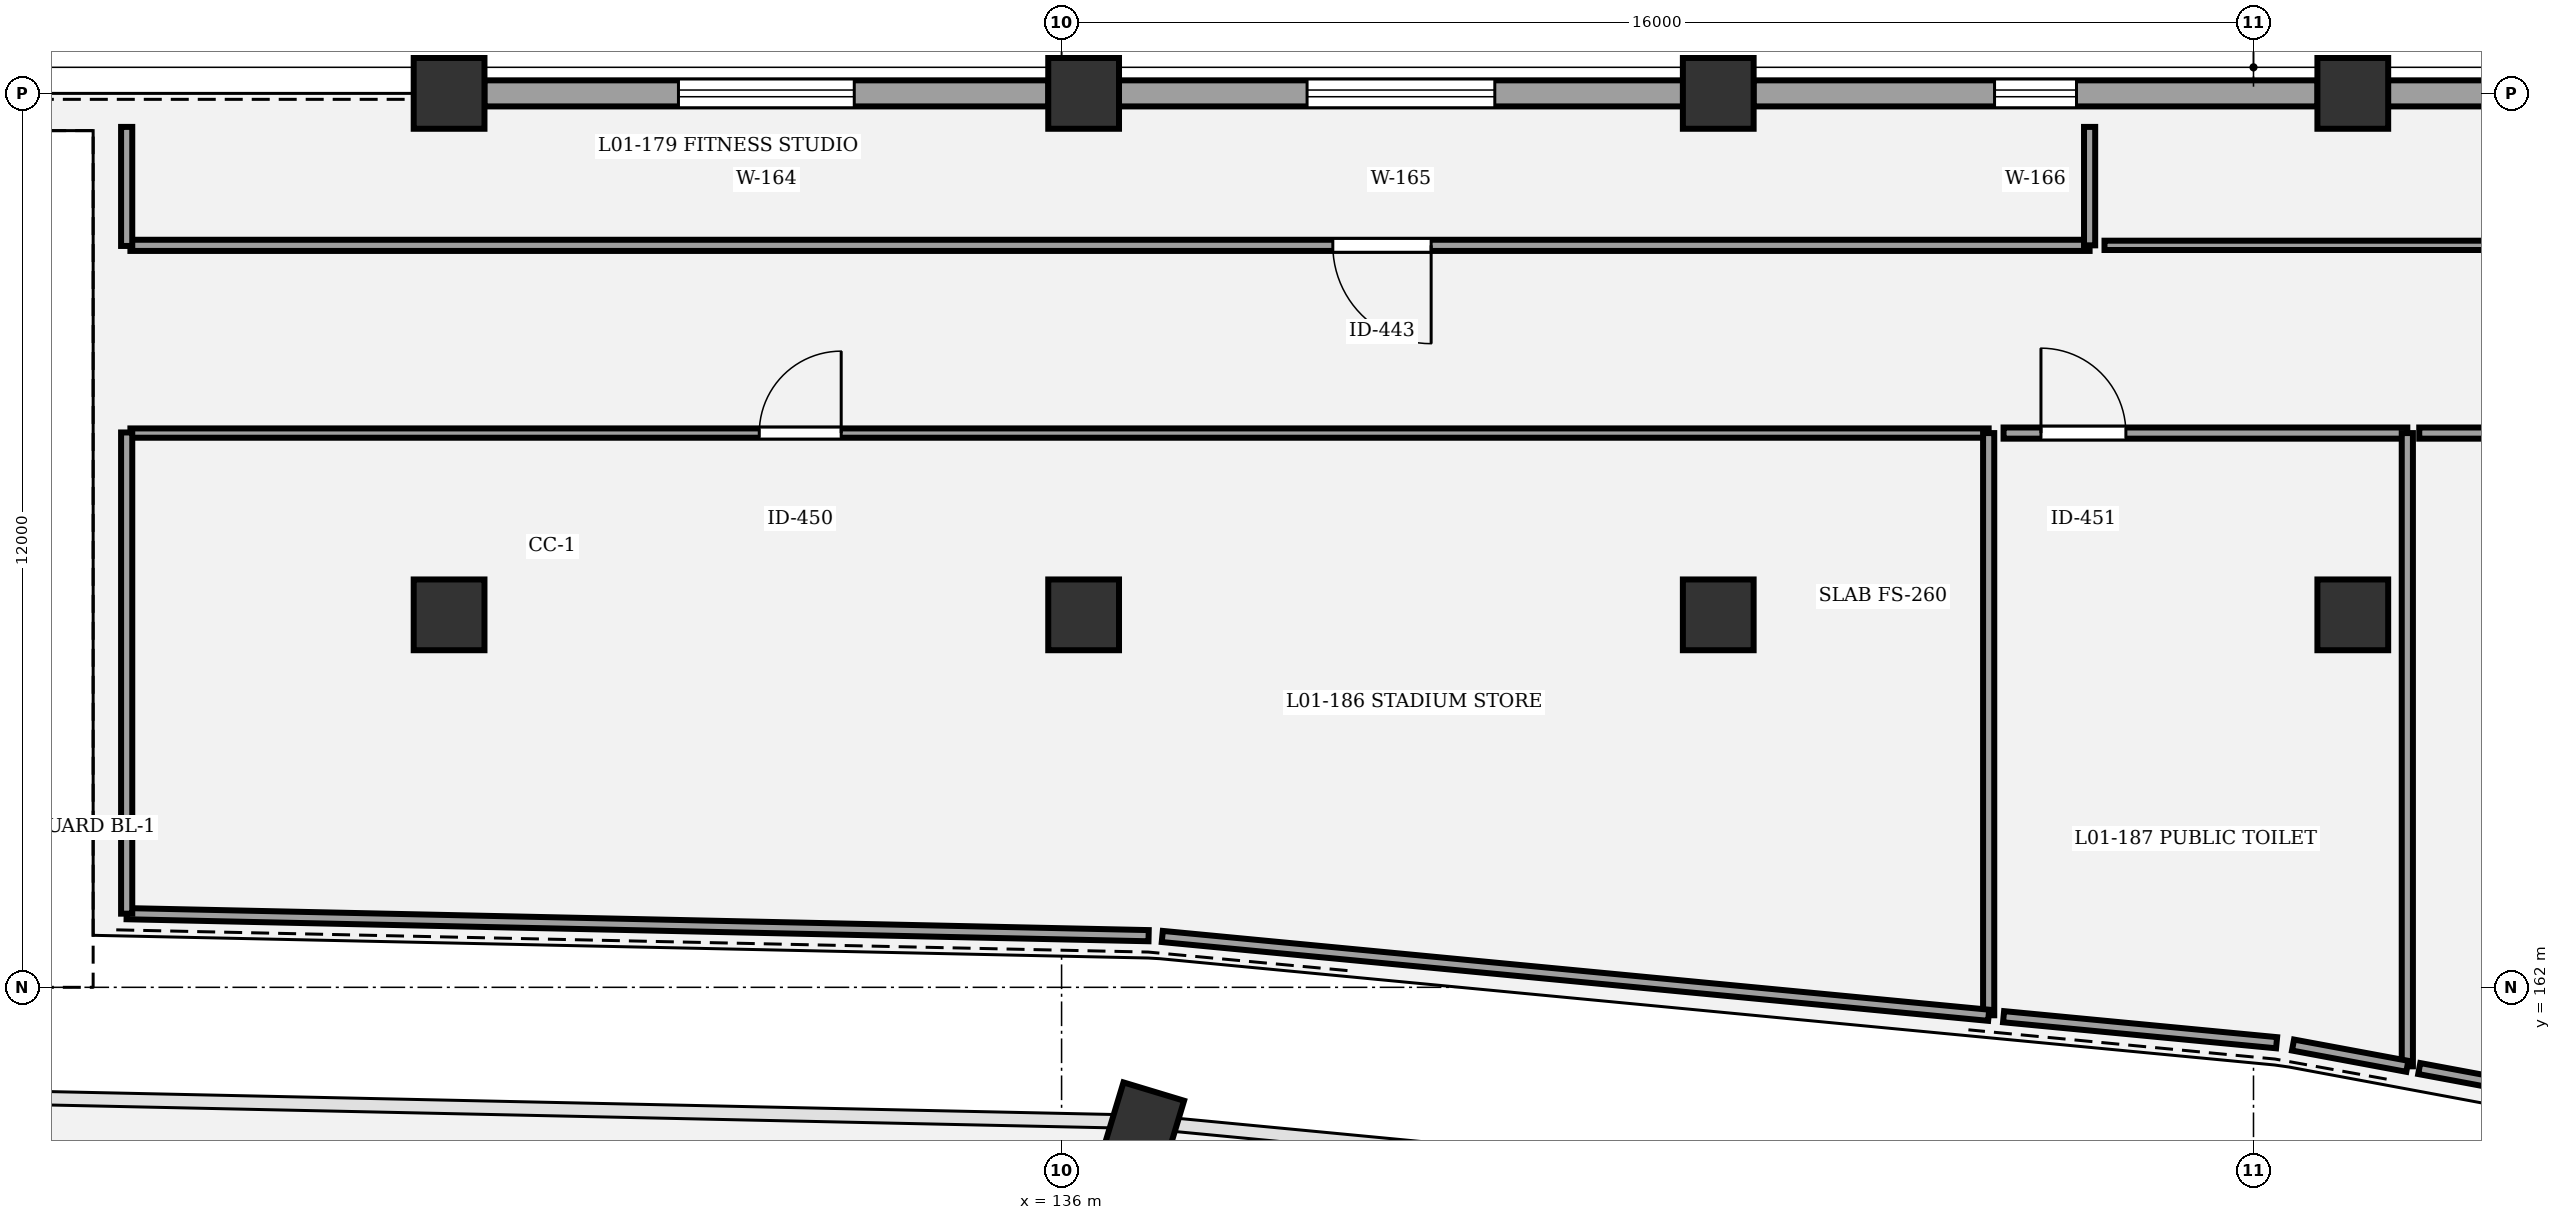
"""IFC4 building model, lengths in metres.
Left out: names, types, materials, properties, quantities, classifications, styles, units other than length and angle.
Written with IfcOpenShell. Run it as: python <this file> out.ifc"""

import sys

from ifc_helpers import new_model, si_unit, direction, frame, frame_2d, origin, origin_2d, place, context, subcontext, project, spatial, rectangle, circle, extrude, element, fill, save


model = new_model("IFC4")
c1 = context("Model", 3, precision=1e-05, world=origin(), true_north=direction((0.0, 1.0)))
c2 = subcontext(c1, "Body", "Model", "MODEL_VIEW")
j1 = project(units=[si_unit("LENGTHUNIT", "METRE"), si_unit("PLANEANGLEUNIT", "RADIAN")], contexts=[c1])
p1 = place(None, origin())
s1 = spatial("IfcSite", under=j1, at=p1, CompositionType="ELEMENT")
p2 = place(p1, origin())
s2 = spatial("IfcBuilding", under=s1, at=p2, CompositionType="ELEMENT")
p3 = place(p2, frame((0.0, 0.0, 5.4)))
s3 = spatial("IfcBuildingStorey", under=s2, at=p3, CompositionType="ELEMENT", Elevation=5.4)
p4 = place(p3, frame((137.115, 160.194, 0.0), z_axis=(0.0, 0.0, 1.0), x_axis=(0.289198876314, 0.957269037387, 0.0)))
e1 = element("IfcColumn", 1, at=p4, inside=s3, PredefinedType="COLUMN", context=c2, shape_type="SweptSolid", body=[
    extrude(rectangle(XDim=0.85, YDim=0.85, at=origin_2d()), origin(), (0.0, 0.0, 1.0), 4.8),
])
for number, where, z_axis, x_axis in (
    (2, (127.778, 167.0, 0.0), (0.0, 0.0, 1.0), (1.0, 0.0, 0.0)),
    (3, (127.778, 174.0, 0.0), (0.0, 0.0, 1.0), (1.0, 0.0, 0.0)),
    (4, (136.296, 167.0, 0.0), (0.0, 0.0, 1.0), (1.0, 0.0, 0.0)),
    (5, (136.296, 174.0, 0.0), (0.0, 0.0, 1.0), (1.0, 0.0, 0.0)),
    (6, (144.815, 167.0, 0.0), (0.0, 0.0, 1.0), (1.0, 0.0, 0.0)),
    (7, (144.815, 174.0, 0.0), (0.0, 0.0, 1.0), (1.0, 0.0, 0.0)),
    (8, (153.333, 167.0, 0.0), (0.0, 0.0, 1.0), (1.0, 0.0, 0.0)),
    (9, (153.333, 174.0, 0.0), (0.0, 0.0, 1.0), (1.0, 0.0, 0.0)),
):
    element("IfcColumn", number, at=place(p3, frame(where, z_axis=z_axis, x_axis=x_axis)), inside=s3, PredefinedType="COLUMN", context=c2, shape_type="SweptSolid", body=[
        extrude(circle(Radius=0.475, at=origin_2d()), origin(), (0.0, 0.0, 1.0), 4.8),
    ])
p5 = place(p3, frame((128.251, 174.0, 0.0), z_axis=(0.0, 0.0, 1.0), x_axis=(1.0, 0.0, 0.0)))
e10 = element("IfcWall", 10, at=p5, inside=s3, PredefinedType="STANDARD", context=c2, shape_type="SweptSolid", body=[
    extrude(rectangle(XDim=7.572, YDim=0.35, at=frame_2d((3.786, 0.0))), origin(), (0.0, 0.0, 1.0), 3.56),
])
p6 = place(p5, frame((2.606, 0.0, 0.9)))
e11 = element("IfcOpeningElement", 11, at=p6, cuts=e10, PredefinedType="OPENING", context=c2, shape_type="SweptSolid", body=[
    extrude(rectangle(XDim=2.36, YDim=1.95, at=frame_2d((1.18, 0.975))), frame((0.0, 0.185, 0.0), z_axis=(0.0, -1.0, 0.0), x_axis=(1.0, 0.0, 0.0)), (0.0, 0.0, 1.0), 0.37),
])
p7 = place(p3, frame((136.769, 174.0, 0.0), z_axis=(0.0, 0.0, 1.0), x_axis=(1.0, 0.0, 0.0)))
e12 = element("IfcWall", 12, at=p7, inside=s3, PredefinedType="STANDARD", context=c2, shape_type="SweptSolid", body=[
    extrude(rectangle(XDim=7.573, YDim=0.35, at=frame_2d((3.787, 0.0))), origin(), (0.0, 0.0, 1.0), 3.56),
])
p8 = place(p7, frame((2.527, 0.0, 0.9)))
e13 = element("IfcOpeningElement", 13, at=p8, cuts=e12, PredefinedType="OPENING", context=c2, shape_type="SweptSolid", body=[
    extrude(rectangle(XDim=2.52, YDim=1.95, at=frame_2d((1.26, 0.975))), frame((0.0, 0.185, 0.0), z_axis=(0.0, -1.0, 0.0), x_axis=(1.0, 0.0, 0.0)), (0.0, 0.0, 1.0), 0.37),
])
p9 = place(p3, frame((145.288, 174.0, 0.0), z_axis=(0.0, 0.0, 1.0), x_axis=(1.0, 0.0, 0.0)))
e14 = element("IfcWall", 14, at=p9, inside=s3, PredefinedType="STANDARD", context=c2, shape_type="SweptSolid", body=[
    extrude(rectangle(XDim=7.572, YDim=0.35, at=frame_2d((3.786, 0.0))), origin(), (0.0, 0.0, 1.0), 3.56),
])
p10 = place(p9, frame((3.236, 0.0, 0.9)))
e15 = element("IfcOpeningElement", 15, at=p10, cuts=e14, PredefinedType="OPENING", context=c2, shape_type="SweptSolid", body=[
    extrude(rectangle(XDim=1.1, YDim=2.15, at=frame_2d((0.55, 1.075))), frame((0.0, 0.185, 0.0), z_axis=(0.0, -1.0, 0.0), x_axis=(1.0, 0.0, 0.0)), (0.0, 0.0, 1.0), 0.37),
])
p11 = place(p3, frame((153.806, 174.0, 0.0), z_axis=(0.0, 0.0, 1.0), x_axis=(1.0, 0.0, 0.0)))
e16 = element("IfcWall", 16, at=p11, inside=s3, PredefinedType="STANDARD", context=c2, shape_type="SweptSolid", body=[
    extrude(rectangle(XDim=7.573, YDim=0.35, at=frame_2d((3.787, 0.0))), origin(), (0.0, 0.0, 1.0), 3.56),
])
p12 = place(p11, frame((3.167, 0.0, 0.9)))
e17 = element("IfcOpeningElement", 17, at=p12, cuts=e16, PredefinedType="OPENING", context=c2, shape_type="SweptSolid", body=[
    extrude(rectangle(XDim=1.24, YDim=2.15, at=frame_2d((0.62, 1.075))), frame((0.0, 0.185, 0.0), z_axis=(0.0, -1.0, 0.0), x_axis=(1.0, 0.0, 0.0)), (0.0, 0.0, 1.0), 0.37),
])
p13 = place(p3, frame((149.8, 171.96, 0.0), z_axis=(0.0, 0.0, 1.0), x_axis=(-1.0, 0.0, 0.0)))
e18 = element("IfcWall", 18, at=p13, inside=s3, PredefinedType="PARTITIONING", context=c2, shape_type="SweptSolid", body=[
    extrude(rectangle(XDim=26.3, YDim=0.15, at=frame_2d((13.15, 0.0))), origin(), (0.0, 0.0, 1.0), 3.55),
])
p14 = place(p13, frame((8.839, 0.0, 0.0)))
e19 = element("IfcOpeningElement", 19, at=p14, cuts=e18, PredefinedType="OPENING", context=c2, shape_type="SweptSolid", body=[
    extrude(rectangle(XDim=1.32, YDim=2.1, at=frame_2d((0.66, 1.05))), frame((0.0, 0.085, 0.0), z_axis=(0.0, -1.0, 0.0), x_axis=(1.0, 0.0, 0.0)), (0.0, 0.0, 1.0), 0.17),
])
p15 = place(p3, frame((176.1, 171.96, 0.0), z_axis=(0.0, 0.0, 1.0), x_axis=(-1.0, 0.0, 0.0)))
e20 = element("IfcWall", 20, at=p15, inside=s3, PredefinedType="PARTITIONING", context=c2, shape_type="SweptSolid", body=[
    extrude(rectangle(XDim=26.1, YDim=0.125, at=frame_2d((13.05, 0.0))), origin(), (0.0, 0.0, 1.0), 3.55),
])
p16 = place(p15, frame((8.741, 0.0, 0.0)))
e21 = element("IfcOpeningElement", 21, at=p16, cuts=e20, PredefinedType="OPENING", context=c2, shape_type="SweptSolid", body=[
    extrude(rectangle(XDim=1.4, YDim=2.1, at=frame_2d((0.7, 1.05))), frame((0.0, 0.073, 0.0), z_axis=(0.0, -1.0, 0.0), x_axis=(1.0, 0.0, 0.0)), (0.0, 0.0, 1.0), 0.145),
])
p17 = place(p3, frame((123.5, 169.44, 0.0), z_axis=(0.0, 0.0, 1.0), x_axis=(1.0, 0.0, 0.0)))
e22 = element("IfcWall", 22, at=p17, inside=s3, PredefinedType="PARTITIONING", context=c2, shape_type="SweptSolid", body=[
    extrude(rectangle(XDim=24.945, YDim=0.125, at=frame_2d((12.473, 0.0))), origin(), (0.0, 0.0, 1.0), 3.55),
])
p18 = place(p17, frame((8.442, 0.0, 0.0)))
e23 = element("IfcOpeningElement", 23, at=p18, cuts=e22, PredefinedType="OPENING", context=c2, shape_type="SweptSolid", body=[
    extrude(rectangle(XDim=1.1, YDim=2.2, at=frame_2d((0.55, 1.1))), frame((0.0, 0.073, 0.0), z_axis=(0.0, -1.0, 0.0), x_axis=(1.0, 0.0, 0.0)), (0.0, 0.0, 1.0), 0.145),
])
p19 = place(p3, frame((148.645, 169.44, 0.0), z_axis=(0.0, 0.0, 1.0), x_axis=(1.0, 0.0, 0.0)))
e24 = element("IfcWall", 24, at=p19, inside=s3, PredefinedType="PARTITIONING", context=c2, shape_type="SweptSolid", body=[
    extrude(rectangle(XDim=5.42, YDim=0.15, at=frame_2d((2.71, 0.0))), origin(), (0.0, 0.0, 1.0), 3.55),
])
p20 = place(p19, frame((0.502, 0.0, 0.0)))
e25 = element("IfcOpeningElement", 25, at=p20, cuts=e24, PredefinedType="OPENING", context=c2, shape_type="SweptSolid", body=[
    extrude(rectangle(XDim=1.14, YDim=2.2, at=frame_2d((0.57, 1.1))), frame((0.0, 0.085, 0.0), z_axis=(0.0, -1.0, 0.0), x_axis=(1.0, 0.0, 0.0)), (0.0, 0.0, 1.0), 0.17),
])
p21 = place(p3, frame((154.225, 169.44, 0.0), z_axis=(0.0, 0.0, 1.0), x_axis=(1.0, 0.0, 0.0)))
e26 = element("IfcWall", 26, at=p21, inside=s3, PredefinedType="PARTITIONING", context=c2, shape_type="SweptSolid", body=[
    extrude(rectangle(XDim=19.415, YDim=0.15, at=frame_2d((9.708, 0.0))), origin(), (0.0, 0.0, 1.0), 3.55),
])
p22 = place(p21, frame((2.431, 0.0, 0.0)))
e27 = element("IfcOpeningElement", 27, at=p22, cuts=e26, PredefinedType="OPENING", context=c2, shape_type="SweptSolid", body=[
    extrude(rectangle(XDim=1.18, YDim=2.2, at=frame_2d((0.59, 1.1))), frame((0.0, 0.085, 0.0), z_axis=(0.0, -1.0, 0.0), x_axis=(1.0, 0.0, 0.0)), (0.0, 0.0, 1.0), 0.17),
])
p23 = place(p3, frame((123.45, 171.952, 0.0), z_axis=(0.0, 0.0, 1.0), x_axis=(0.0, 1.0, 0.0)))
e28 = element("IfcWall", 28, at=p23, inside=s3, PredefinedType="PARTITIONING", context=c2, shape_type="SweptSolid", body=[
    extrude(rectangle(XDim=1.598, YDim=0.15, at=frame_2d((0.799, 0.0))), origin(), (0.0, 0.0, 1.0), 3.55),
])
p24 = place(p3, frame((149.8, 173.55, 0.0), z_axis=(0.0, 0.0, 1.0), x_axis=(0.0, -1.0, 0.0)))
e29 = element("IfcWall", 29, at=p24, inside=s3, PredefinedType="PARTITIONING", context=c2, shape_type="SweptSolid", body=[
    extrude(rectangle(XDim=1.59, YDim=0.15, at=frame_2d((0.795, 0.0))), origin(), (0.0, 0.0, 1.0), 3.55),
])
p25 = place(p3, frame((137.168, 162.693, 0.0), z_axis=(0.0, 0.0, 1.0), x_axis=(-0.999768230535, 0.021528706714, 0.0)))
e30 = element("IfcWall", 30, at=p25, inside=s3, PredefinedType="PARTITIONING", context=c2, shape_type="SweptSolid", body=[
    extrude(rectangle(XDim=13.722, YDim=0.15, at=frame_2d((6.861, 0.0))), origin(), (0.0, 0.0, 1.0), 3.55),
])
p26 = place(p3, frame((123.45, 162.989, 0.0), z_axis=(0.0, 0.0, 1.0), x_axis=(0.0, 1.0, 0.0)))
e31 = element("IfcWall", 31, at=p26, inside=s3, PredefinedType="PARTITIONING", context=c2, shape_type="SweptSolid", body=[
    extrude(rectangle(XDim=6.46, YDim=0.15, at=frame_2d((3.23, 0.0))), origin(), (0.0, 0.0, 1.0), 3.55),
])
p27 = place(p3, frame((148.445, 169.44, 0.0), z_axis=(0.0, 0.0, 1.0), x_axis=(0.0, -1.0, 0.0)))
e32 = element("IfcWall", 32, at=p27, inside=s3, PredefinedType="PARTITIONING", context=c2, shape_type="SweptSolid", body=[
    extrude(rectangle(XDim=7.815, YDim=0.15, at=frame_2d((3.908, 0.0))), origin(), (0.0, 0.0, 1.0), 3.55),
])
p28 = place(p3, frame((148.445, 161.625, 0.0), z_axis=(0.0, 0.0, 1.0), x_axis=(-0.995483944756, 0.094930057059, 0.0)))
e33 = element("IfcWall", 33, at=p28, inside=s3, PredefinedType="PARTITIONING", context=c2, shape_type="SweptSolid", body=[
    extrude(rectangle(XDim=11.144, YDim=0.15, at=frame_2d((5.572, 0.0))), origin(), (0.0, 0.0, 1.0), 3.55),
])
p29 = place(p3, frame((152.31, 161.256, 0.0), z_axis=(0.0, 0.0, 1.0), x_axis=(-0.995481155674, 0.094959300221, 0.0)))
e34 = element("IfcWall", 34, at=p29, inside=s3, PredefinedType="PARTITIONING", context=c2, shape_type="SweptSolid", body=[
    extrude(rectangle(XDim=3.682, YDim=0.15, at=frame_2d((1.841, 0.0))), origin(), (0.0, 0.0, 1.0), 3.55),
])
p30 = place(p3, frame((154.065, 169.44, 0.0), z_axis=(0.0, 0.0, 1.0), x_axis=(0.0, -1.0, 0.0)))
e35 = element("IfcWall", 35, at=p30, inside=s3, PredefinedType="PARTITIONING", context=c2, shape_type="SweptSolid", body=[
    extrude(rectangle(XDim=8.5, YDim=0.15, at=frame_2d((4.25, 0.0))), origin(), (0.0, 0.0, 1.0), 3.55),
])
p31 = place(p3, frame((154.065, 160.939, 0.0), z_axis=(0.0, 0.0, 1.0), x_axis=(-0.983110419565, 0.183013395528, 0.0)))
e36 = element("IfcWall", 36, at=p31, inside=s3, PredefinedType="PARTITIONING", context=c2, shape_type="SweptSolid", body=[
    extrude(rectangle(XDim=1.561, YDim=0.15, at=frame_2d((0.78, 0.0))), origin(), (0.0, 0.0, 1.0), 3.55),
])
p32 = place(p3, frame((165.259, 158.854, 0.0), z_axis=(0.0, 0.0, 1.0), x_axis=(-0.983091639371, 0.183114250127, 0.0)))
e37 = element("IfcWall", 37, at=p32, inside=s3, PredefinedType="PARTITIONING", context=c2, shape_type="SweptSolid", body=[
    extrude(rectangle(XDim=11.223, YDim=0.15, at=frame_2d((5.612, 0.0))), origin(), (0.0, 0.0, 1.0), 3.55),
])
p33 = place(p6, origin())
e38 = element("IfcWindow", 38, at=p33, inside=s3, PartitioningType="SINGLE_PANEL", PredefinedType="WINDOW", context=c2, shape_type="SweptSolid", body=[
    extrude(rectangle(XDim=2.36, YDim=1.95, at=frame_2d((1.18, 0.975))), frame((0.0, 0.03, 0.0), z_axis=(0.0, -1.0, 0.0), x_axis=(1.0, 0.0, 0.0)), (0.0, 0.0, 1.0), 0.06),
])
fill(e11, e38)
p34 = place(p8, origin())
e39 = element("IfcWindow", 39, at=p34, inside=s3, PartitioningType="SINGLE_PANEL", PredefinedType="WINDOW", context=c2, shape_type="SweptSolid", body=[
    extrude(rectangle(XDim=2.52, YDim=1.95, at=frame_2d((1.26, 0.975))), frame((0.0, 0.03, 0.0), z_axis=(0.0, -1.0, 0.0), x_axis=(1.0, 0.0, 0.0)), (0.0, 0.0, 1.0), 0.06),
])
fill(e13, e39)
p35 = place(p10, origin())
e40 = element("IfcWindow", 40, at=p35, inside=s3, PartitioningType="SINGLE_PANEL", PredefinedType="WINDOW", context=c2, shape_type="SweptSolid", body=[
    extrude(rectangle(XDim=1.1, YDim=2.15, at=frame_2d((0.55, 1.075))), frame((0.0, 0.03, 0.0), z_axis=(0.0, -1.0, 0.0), x_axis=(1.0, 0.0, 0.0)), (0.0, 0.0, 1.0), 0.06),
])
fill(e15, e40)
p36 = place(p14, origin())
e41 = element("IfcDoor", 41, at=p36, inside=s3, OperationType="SINGLE_SWING_LEFT", PredefinedType="DOOR", context=c2, shape_type="SweptSolid", body=[
    extrude(rectangle(XDim=1.32, YDim=2.1, at=frame_2d((0.66, 1.05))), frame((0.0, 0.025, 0.0), z_axis=(0.0, -1.0, 0.0), x_axis=(1.0, 0.0, 0.0)), (0.0, 0.0, 1.0), 0.05),
])
fill(e19, e41)
p37 = place(p18, origin())
e42 = element("IfcDoor", 42, at=p37, inside=s3, OperationType="SINGLE_SWING_RIGHT", PredefinedType="DOOR", context=c2, shape_type="SweptSolid", body=[
    extrude(rectangle(XDim=1.1, YDim=2.2, at=frame_2d((0.55, 1.1))), frame((0.0, 0.025, 0.0), z_axis=(0.0, -1.0, 0.0), x_axis=(1.0, 0.0, 0.0)), (0.0, 0.0, 1.0), 0.05),
])
fill(e23, e42)
p38 = place(p20, origin())
e43 = element("IfcDoor", 43, at=p38, inside=s3, OperationType="SINGLE_SWING_LEFT", PredefinedType="DOOR", context=c2, shape_type="SweptSolid", body=[
    extrude(rectangle(XDim=1.14, YDim=2.2, at=frame_2d((0.57, 1.1))), frame((0.0, 0.025, 0.0), z_axis=(0.0, -1.0, 0.0), x_axis=(1.0, 0.0, 0.0)), (0.0, 0.0, 1.0), 0.05),
])
fill(e25, e43)
save(model, sys.argv[1])
